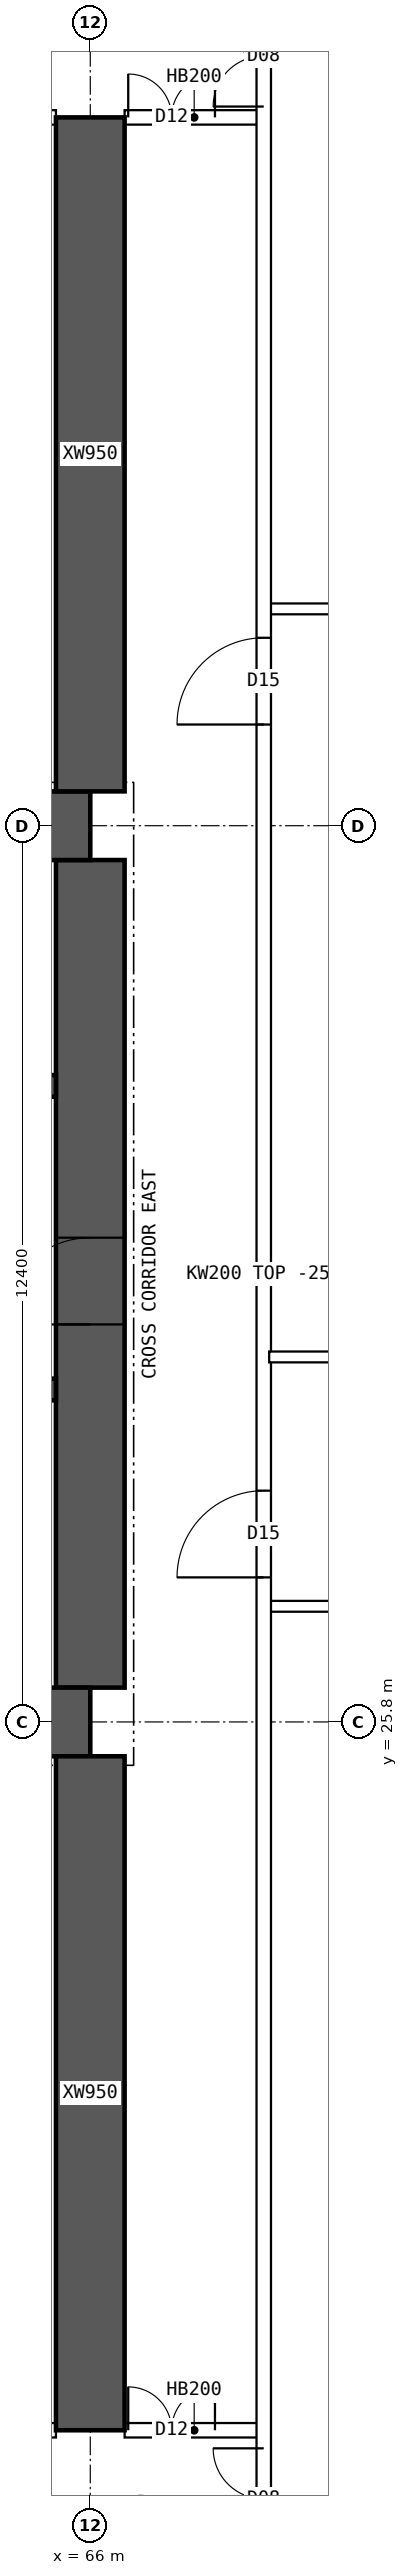
"""IFC4 building model, lengths in metres.
Left out: names, types, materials, properties, quantities, classifications, styles, units other than length and angle.
Written with IfcOpenShell. Run it as: python <this file> out.ifc"""

import sys

from ifc_helpers import new_model, si_unit, direction, frame, frame_2d, origin, place, context, subcontext, project, spatial, polyline, rectangle, outline, extrude, element, fill, save


model = new_model("IFC4")
c1 = context("Model", 3, precision=1e-05, world=origin(), true_north=direction((0.0, 1.0)))
c2 = subcontext(c1, "Body", "Model", "MODEL_VIEW")
j1 = project(units=[si_unit("LENGTHUNIT", "METRE"), si_unit("PLANEANGLEUNIT", "RADIAN")], contexts=[c1])
p1 = place(None, origin())
s1 = spatial("IfcSite", under=j1, at=p1, CompositionType="ELEMENT")
p2 = place(p1, origin())
s2 = spatial("IfcBuilding", under=s1, at=p2, CompositionType="ELEMENT")
p3 = place(p2, frame((0.0, 0.0, 99.4)))
s3 = spatial("IfcBuildingStorey", under=s2, at=p3, CompositionType="ELEMENT", Elevation=99.4)
for number, where, z_axis, x_axis in (
    (1, (18.0, 25.8, 0.0), (0.0, 0.0, 1.0), (1.0, 0.0, 0.0)),
    (2, (18.0, 38.2, 0.0), (0.0, 0.0, 1.0), (1.0, 0.0, 0.0)),
):
    element("IfcWall", number, at=place(p3, frame(where, z_axis=z_axis, x_axis=x_axis)), inside=s3, PredefinedType="SHEAR", context=c2, shape_type="SweptSolid", body=[
        extrude(rectangle(XDim=48.0, YDim=0.95, at=frame_2d((24.0, 0.0))), origin(), (0.0, 0.0, 1.0), 3.75),
    ])
p4 = place(p3, frame((66.0, 26.275, 0.0), z_axis=(0.0, 0.0, 1.0), x_axis=(0.0, 1.0, 0.0)))
e3 = element("IfcWall", 3, at=p4, inside=s3, PredefinedType="SHEAR", context=c2, shape_type="SweptSolid", body=[
    extrude(rectangle(XDim=11.45, YDim=0.95, at=frame_2d((5.725, 0.0))), origin(), (0.0, 0.0, 1.0), 3.75),
])
p5 = place(p4, frame((5.025, 0.0, 0.0)))
e4 = element("IfcOpeningElement", 4, at=p5, cuts=e3, PredefinedType="OPENING", context=c2, shape_type="SweptSolid", body=[
    extrude(rectangle(XDim=1.2, YDim=2.1, at=frame_2d((0.6, 1.05))), frame((0.0, 0.485, 0.0), z_axis=(0.0, -1.0, 0.0), x_axis=(1.0, 0.0, 0.0)), (0.0, 0.0, 1.0), 0.97),
])
p6 = place(p3, frame((18.475, 30.4, 0.0), z_axis=(0.0, 0.0, 1.0), x_axis=(1.0, 0.0, 0.0)))
e5 = element("IfcWall", 5, at=p6, inside=s3, PredefinedType="SHEAR", context=c2, shape_type="SweptSolid", body=[
    extrude(rectangle(XDim=47.05, YDim=0.3, at=frame_2d((23.525, 0.0))), origin(), (0.0, 0.0, 1.0), 3.75),
])
p7 = place(p6, frame((0.4, 0.0, 0.0)))
e6 = element("IfcOpeningElement", 6, at=p7, cuts=e5, PredefinedType="OPENING", context=c2, shape_type="SweptSolid", body=[
    extrude(rectangle(XDim=1.0, YDim=2.1, at=frame_2d((0.5, 1.05))), frame((0.0, 0.16, 0.0), z_axis=(0.0, -1.0, 0.0), x_axis=(1.0, 0.0, 0.0)), (0.0, 0.0, 1.0), 0.32),
])
p8 = place(p6, frame((45.65, 0.0, 0.0)))
e7 = element("IfcOpeningElement", 7, at=p8, cuts=e5, PredefinedType="OPENING", context=c2, shape_type="SweptSolid", body=[
    extrude(rectangle(XDim=1.0, YDim=2.1, at=frame_2d((0.5, 1.05))), frame((0.0, 0.16, 0.0), z_axis=(0.0, -1.0, 0.0), x_axis=(1.0, 0.0, 0.0)), (0.0, 0.0, 1.0), 0.32),
])
p9 = place(p6, frame((8.275, 0.0, 0.0)))
e8 = element("IfcOpeningElement", 8, at=p9, cuts=e5, PredefinedType="OPENING", context=c2, shape_type="SweptSolid", body=[
    extrude(rectangle(XDim=1.1, YDim=2.1, at=frame_2d((0.55, 1.05))), frame((0.0, 0.16, 0.0), z_axis=(0.0, -1.0, 0.0), x_axis=(1.0, 0.0, 0.0)), (0.0, 0.0, 1.0), 0.32),
])
p10 = place(p6, frame((10.875, 0.0, 0.0)))
e9 = element("IfcOpeningElement", 9, at=p10, cuts=e5, PredefinedType="OPENING", context=c2, shape_type="SweptSolid", body=[
    extrude(rectangle(XDim=1.1, YDim=2.1, at=frame_2d((0.55, 1.05))), frame((0.0, 0.16, 0.0), z_axis=(0.0, -1.0, 0.0), x_axis=(1.0, 0.0, 0.0)), (0.0, 0.0, 1.0), 0.32),
])
p11 = place(p6, frame((13.475, 0.0, 0.0)))
e10 = element("IfcOpeningElement", 10, at=p11, cuts=e5, PredefinedType="OPENING", context=c2, shape_type="SweptSolid", body=[
    extrude(rectangle(XDim=1.1, YDim=2.1, at=frame_2d((0.55, 1.05))), frame((0.0, 0.16, 0.0), z_axis=(0.0, -1.0, 0.0), x_axis=(1.0, 0.0, 0.0)), (0.0, 0.0, 1.0), 0.32),
])
p12 = place(p6, frame((16.075, 0.0, 0.0)))
e11 = element("IfcOpeningElement", 11, at=p12, cuts=e5, PredefinedType="OPENING", context=c2, shape_type="SweptSolid", body=[
    extrude(rectangle(XDim=1.1, YDim=2.1, at=frame_2d((0.55, 1.05))), frame((0.0, 0.16, 0.0), z_axis=(0.0, -1.0, 0.0), x_axis=(1.0, 0.0, 0.0)), (0.0, 0.0, 1.0), 0.32),
])
p13 = place(p6, frame((18.85, 0.0, 0.0)))
e12 = element("IfcOpeningElement", 12, at=p13, cuts=e5, PredefinedType="OPENING", context=c2, shape_type="SweptSolid", body=[
    extrude(rectangle(XDim=0.9, YDim=2.1, at=frame_2d((0.45, 1.05))), frame((0.0, 0.16, 0.0), z_axis=(0.0, -1.0, 0.0), x_axis=(1.0, 0.0, 0.0)), (0.0, 0.0, 1.0), 0.32),
])
p14 = place(p6, frame((30.142, 0.0, 0.0)))
e13 = element("IfcOpeningElement", 13, at=p14, cuts=e5, PredefinedType="OPENING", context=c2, shape_type="SweptSolid", body=[
    extrude(rectangle(XDim=1.1, YDim=2.1, at=frame_2d((0.55, 1.05))), frame((0.0, 0.16, 0.0), z_axis=(0.0, -1.0, 0.0), x_axis=(1.0, 0.0, 0.0)), (0.0, 0.0, 1.0), 0.32),
])
p15 = place(p6, frame((33.675, 0.0, 0.0)))
e14 = element("IfcOpeningElement", 14, at=p15, cuts=e5, PredefinedType="OPENING", context=c2, shape_type="SweptSolid", body=[
    extrude(rectangle(XDim=1.1, YDim=2.1, at=frame_2d((0.55, 1.05))), frame((0.0, 0.16, 0.0), z_axis=(0.0, -1.0, 0.0), x_axis=(1.0, 0.0, 0.0)), (0.0, 0.0, 1.0), 0.32),
])
p16 = place(p6, frame((37.208, 0.0, 0.0)))
e15 = element("IfcOpeningElement", 15, at=p16, cuts=e5, PredefinedType="OPENING", context=c2, shape_type="SweptSolid", body=[
    extrude(rectangle(XDim=1.1, YDim=2.1, at=frame_2d((0.55, 1.05))), frame((0.0, 0.16, 0.0), z_axis=(0.0, -1.0, 0.0), x_axis=(1.0, 0.0, 0.0)), (0.0, 0.0, 1.0), 0.32),
])
p17 = place(p3, frame((18.475, 34.6, 0.0), z_axis=(0.0, 0.0, 1.0), x_axis=(1.0, 0.0, 0.0)))
e16 = element("IfcWall", 16, at=p17, inside=s3, PredefinedType="SHEAR", context=c2, shape_type="SweptSolid", body=[
    extrude(rectangle(XDim=47.05, YDim=0.3, at=frame_2d((23.525, 0.0))), origin(), (0.0, 0.0, 1.0), 3.75),
])
p18 = place(p17, frame((0.9, 0.0, 0.0)))
e17 = element("IfcOpeningElement", 17, at=p18, cuts=e16, PredefinedType="OPENING", context=c2, shape_type="SweptSolid", body=[
    extrude(rectangle(XDim=1.1, YDim=2.1, at=frame_2d((0.55, 1.05))), frame((0.0, 0.16, 0.0), z_axis=(0.0, -1.0, 0.0), x_axis=(1.0, 0.0, 0.0)), (0.0, 0.0, 1.0), 0.32),
])
p19 = place(p17, frame((45.05, 0.0, 0.0)))
e18 = element("IfcOpeningElement", 18, at=p19, cuts=e16, PredefinedType="OPENING", context=c2, shape_type="SweptSolid", body=[
    extrude(rectangle(XDim=1.1, YDim=2.1, at=frame_2d((0.55, 1.05))), frame((0.0, 0.16, 0.0), z_axis=(0.0, -1.0, 0.0), x_axis=(1.0, 0.0, 0.0)), (0.0, 0.0, 1.0), 0.32),
])
p20 = place(p17, frame((4.125, 0.0, 0.0)))
e19 = element("IfcOpeningElement", 19, at=p20, cuts=e16, PredefinedType="OPENING", context=c2, shape_type="SweptSolid", body=[
    extrude(rectangle(XDim=0.9, YDim=2.1, at=frame_2d((0.45, 1.05))), frame((0.0, 0.16, 0.0), z_axis=(0.0, -1.0, 0.0), x_axis=(1.0, 0.0, 0.0)), (0.0, 0.0, 1.0), 0.32),
])
p21 = place(p17, frame((42.025, 0.0, 0.0)))
e20 = element("IfcOpeningElement", 20, at=p21, cuts=e16, PredefinedType="OPENING", context=c2, shape_type="SweptSolid", body=[
    extrude(rectangle(XDim=0.9, YDim=2.1, at=frame_2d((0.45, 1.05))), frame((0.0, 0.16, 0.0), z_axis=(0.0, -1.0, 0.0), x_axis=(1.0, 0.0, 0.0)), (0.0, 0.0, 1.0), 0.32),
])
p22 = place(p17, frame((8.9, 0.0, 0.0)))
e21 = element("IfcOpeningElement", 21, at=p22, cuts=e16, PredefinedType="OPENING", context=c2, shape_type="SweptSolid", body=[
    extrude(rectangle(XDim=0.9, YDim=2.1, at=frame_2d((0.45, 1.05))), frame((0.0, 0.16, 0.0), z_axis=(0.0, -1.0, 0.0), x_axis=(1.0, 0.0, 0.0)), (0.0, 0.0, 1.0), 0.32),
])
p23 = place(p17, frame((12.874, 0.0, 0.0)))
e22 = element("IfcOpeningElement", 22, at=p23, cuts=e16, PredefinedType="OPENING", context=c2, shape_type="SweptSolid", body=[
    extrude(rectangle(XDim=0.9, YDim=2.1, at=frame_2d((0.45, 1.05))), frame((0.0, 0.16, 0.0), z_axis=(0.0, -1.0, 0.0), x_axis=(1.0, 0.0, 0.0)), (0.0, 0.0, 1.0), 0.32),
])
p24 = place(p17, frame((16.521, 0.0, 0.0)))
e23 = element("IfcOpeningElement", 23, at=p24, cuts=e16, PredefinedType="OPENING", context=c2, shape_type="SweptSolid", body=[
    extrude(rectangle(XDim=0.9, YDim=2.1, at=frame_2d((0.45, 1.05))), frame((0.0, 0.16, 0.0), z_axis=(0.0, -1.0, 0.0), x_axis=(1.0, 0.0, 0.0)), (0.0, 0.0, 1.0), 0.32),
])
p25 = place(p17, frame((20.28, 0.0, 0.0)))
e24 = element("IfcOpeningElement", 24, at=p25, cuts=e16, PredefinedType="OPENING", context=c2, shape_type="SweptSolid", body=[
    extrude(rectangle(XDim=0.9, YDim=2.1, at=frame_2d((0.45, 1.05))), frame((0.0, 0.16, 0.0), z_axis=(0.0, -1.0, 0.0), x_axis=(1.0, 0.0, 0.0)), (0.0, 0.0, 1.0), 0.32),
])
p26 = place(p17, frame((24.686, 0.0, 0.0)))
e25 = element("IfcOpeningElement", 25, at=p26, cuts=e16, PredefinedType="OPENING", context=c2, shape_type="SweptSolid", body=[
    extrude(rectangle(XDim=0.9, YDim=2.1, at=frame_2d((0.45, 1.05))), frame((0.0, 0.16, 0.0), z_axis=(0.0, -1.0, 0.0), x_axis=(1.0, 0.0, 0.0)), (0.0, 0.0, 1.0), 0.32),
])
p27 = place(p17, frame((27.483, 0.0, 0.0)))
e26 = element("IfcOpeningElement", 26, at=p27, cuts=e16, PredefinedType="OPENING", context=c2, shape_type="SweptSolid", body=[
    extrude(rectangle(XDim=0.9, YDim=2.1, at=frame_2d((0.45, 1.05))), frame((0.0, 0.16, 0.0), z_axis=(0.0, -1.0, 0.0), x_axis=(1.0, 0.0, 0.0)), (0.0, 0.0, 1.0), 0.32),
])
p28 = place(p17, frame((29.653, 0.0, 0.0)))
e27 = element("IfcOpeningElement", 27, at=p28, cuts=e16, PredefinedType="OPENING", context=c2, shape_type="SweptSolid", body=[
    extrude(rectangle(XDim=0.9, YDim=2.1, at=frame_2d((0.45, 1.05))), frame((0.0, 0.16, 0.0), z_axis=(0.0, -1.0, 0.0), x_axis=(1.0, 0.0, 0.0)), (0.0, 0.0, 1.0), 0.32),
])
p29 = place(p17, frame((33.452, 0.0, 0.0)))
e28 = element("IfcOpeningElement", 28, at=p29, cuts=e16, PredefinedType="OPENING", context=c2, shape_type="SweptSolid", body=[
    extrude(rectangle(XDim=0.9, YDim=2.1, at=frame_2d((0.45, 1.05))), frame((0.0, 0.16, 0.0), z_axis=(0.0, -1.0, 0.0), x_axis=(1.0, 0.0, 0.0)), (0.0, 0.0, 1.0), 0.32),
])
p30 = place(p17, frame((37.403, 0.0, 0.0)))
e29 = element("IfcOpeningElement", 29, at=p30, cuts=e16, PredefinedType="OPENING", context=c2, shape_type="SweptSolid", body=[
    extrude(rectangle(XDim=0.9, YDim=2.1, at=frame_2d((0.45, 1.05))), frame((0.0, 0.16, 0.0), z_axis=(0.0, -1.0, 0.0), x_axis=(1.0, 0.0, 0.0)), (0.0, 0.0, 1.0), 0.32),
])
for number, where, z_axis, x_axis in (
    (30, (66.0, 16.0, 0.0), (0.0, 0.0, 1.0), (0.0, 1.0, 0.0)),
    (31, (66.0, 38.675, 0.0), (0.0, 0.0, 1.0), (0.0, 1.0, 0.0)),
):
    element("IfcWall", number, at=place(p3, frame(where, z_axis=z_axis, x_axis=x_axis)), inside=s3, PredefinedType="SHEAR", context=c2, shape_type="SweptSolid", body=[
        extrude(rectangle(XDim=9.325, YDim=0.95, at=frame_2d((4.663, 0.0))), origin(), (0.0, 0.0, 1.0), 3.75),
    ])
p31 = place(p3, frame((60.475, 16.0, 0.0), z_axis=(0.0, 0.0, 1.0), x_axis=(1.0, 0.0, 0.0)))
e32 = element("IfcWall", 32, at=p31, inside=s3, PredefinedType="SOLIDWALL", context=c2, shape_type="SweptSolid", body=[
    extrude(rectangle(XDim=5.05, YDim=0.2, at=frame_2d((2.525, 0.0))), origin(), (0.0, 0.0, 1.0), 3.5),
])
p32 = place(p31, frame((0.15, 0.0, 0.0)))
e33 = element("IfcOpeningElement", 33, at=p32, cuts=e32, PredefinedType="OPENING", context=c2, shape_type="SweptSolid", body=[
    extrude(rectangle(XDim=0.9, YDim=2.1, at=frame_2d((0.45, 1.05))), frame((0.0, 0.11, 0.0), z_axis=(0.0, -1.0, 0.0), x_axis=(1.0, 0.0, 0.0)), (0.0, 0.0, 1.0), 0.22),
])
p33 = place(p31, frame((3.185, 0.0, 0.0)))
e34 = element("IfcOpeningElement", 34, at=p33, cuts=e32, PredefinedType="OPENING", context=c2, shape_type="SweptSolid", body=[
    extrude(rectangle(XDim=0.9, YDim=2.1, at=frame_2d((0.45, 1.05))), frame((0.0, 0.11, 0.0), z_axis=(0.0, -1.0, 0.0), x_axis=(1.0, 0.0, 0.0)), (0.0, 0.0, 1.0), 0.22),
])
p34 = place(p3, frame((66.475, 16.0, 0.0), z_axis=(0.0, 0.0, 1.0), x_axis=(1.0, 0.0, 0.0)))
e35 = element("IfcWall", 35, at=p34, inside=s3, PredefinedType="SOLIDWALL", context=c2, shape_type="SweptSolid", body=[
    extrude(rectangle(XDim=1.925, YDim=0.2, at=frame_2d((0.962, 0.0))), origin(), (0.0, 0.0, 1.0), 3.5),
])
p35 = place(p34, frame((0.05, 0.0, 0.0)))
e36 = element("IfcOpeningElement", 36, at=p35, cuts=e35, PredefinedType="OPENING", context=c2, shape_type="SweptSolid", body=[
    extrude(rectangle(XDim=1.2, YDim=2.1, at=frame_2d((0.6, 1.05))), frame((0.0, 0.11, 0.0), z_axis=(0.0, -1.0, 0.0), x_axis=(1.0, 0.0, 0.0)), (0.0, 0.0, 1.0), 0.22),
])
p36 = place(p3, frame((60.475, 48.0, 0.0), z_axis=(0.0, 0.0, 1.0), x_axis=(1.0, 0.0, 0.0)))
e37 = element("IfcWall", 37, at=p36, inside=s3, PredefinedType="SOLIDWALL", context=c2, shape_type="SweptSolid", body=[
    extrude(rectangle(XDim=5.05, YDim=0.2, at=frame_2d((2.525, 0.0))), origin(), (0.0, 0.0, 1.0), 3.5),
])
p37 = place(p36, frame((0.15, 0.0, 0.0)))
e38 = element("IfcOpeningElement", 38, at=p37, cuts=e37, PredefinedType="OPENING", context=c2, shape_type="SweptSolid", body=[
    extrude(rectangle(XDim=0.9, YDim=2.1, at=frame_2d((0.45, 1.05))), frame((0.0, 0.11, 0.0), z_axis=(0.0, -1.0, 0.0), x_axis=(1.0, 0.0, 0.0)), (0.0, 0.0, 1.0), 0.22),
])
p38 = place(p36, frame((3.205, 0.0, 0.0)))
e39 = element("IfcOpeningElement", 39, at=p38, cuts=e37, PredefinedType="OPENING", context=c2, shape_type="SweptSolid", body=[
    extrude(rectangle(XDim=0.9, YDim=2.1, at=frame_2d((0.45, 1.05))), frame((0.0, 0.11, 0.0), z_axis=(0.0, -1.0, 0.0), x_axis=(1.0, 0.0, 0.0)), (0.0, 0.0, 1.0), 0.22),
])
p39 = place(p3, frame((66.475, 48.0, 0.0), z_axis=(0.0, 0.0, 1.0), x_axis=(1.0, 0.0, 0.0)))
e40 = element("IfcWall", 40, at=p39, inside=s3, PredefinedType="SOLIDWALL", context=c2, shape_type="SweptSolid", body=[
    extrude(rectangle(XDim=1.925, YDim=0.2, at=frame_2d((0.962, 0.0))), origin(), (0.0, 0.0, 1.0), 3.5),
])
p40 = place(p39, frame((0.05, 0.0, 0.0)))
e41 = element("IfcOpeningElement", 41, at=p40, cuts=e40, PredefinedType="OPENING", context=c2, shape_type="SweptSolid", body=[
    extrude(rectangle(XDim=1.2, YDim=2.1, at=frame_2d((0.6, 1.05))), frame((0.0, 0.11, 0.0), z_axis=(0.0, -1.0, 0.0), x_axis=(1.0, 0.0, 0.0)), (0.0, 0.0, 1.0), 0.22),
])
p41 = place(p3, frame((68.475, 30.85, 0.0), z_axis=(0.0, 0.0, 1.0), x_axis=(1.0, 0.0, 0.0)))
e42 = element("IfcWall", 42, at=p41, inside=s3, PredefinedType="PARTITIONING", context=c2, shape_type="SweptSolid", body=[
    extrude(outline(polyline([(0.0, 0.0), (6.82, 0.0), (6.82, 3.5), (3.827, 3.5), (3.825, 3.05), (3.227, 3.05), (3.225, 3.5), (0.0, 3.5), (0.0, 0.0)])), frame((0.0, 0.075, 0.0), z_axis=(0.0, -1.0, 0.0), x_axis=(1.0, 0.0, 0.0)), (0.0, 0.0, 1.0), 0.15),
])
p42 = place(p3, frame((68.4, 9.405, 0.0), z_axis=(0.0, 0.0, 1.0), x_axis=(0.0, 1.0, 0.0)))
e43 = element("IfcWall", 43, at=p42, inside=s3, PredefinedType="SOLIDWALL", context=c2, shape_type="SweptSolid", body=[
    extrude(rectangle(XDim=45.189, YDim=0.2, at=frame_2d((22.595, 0.0))), origin(), (0.0, 0.0, 1.0), 3.5),
])
p43 = place(p42, frame((18.395, 0.0, 0.0)))
e44 = element("IfcOpeningElement", 44, at=p43, cuts=e43, PredefinedType="OPENING", context=c2, shape_type="SweptSolid", body=[
    extrude(rectangle(XDim=1.2, YDim=2.1, at=frame_2d((0.6, 1.05))), frame((0.0, 0.11, 0.0), z_axis=(0.0, -1.0, 0.0), x_axis=(1.0, 0.0, 0.0)), (0.0, 0.0, 1.0), 0.22),
])
p44 = place(p42, frame((30.195, 0.0, 0.0)))
e45 = element("IfcOpeningElement", 45, at=p44, cuts=e43, PredefinedType="OPENING", context=c2, shape_type="SweptSolid", body=[
    extrude(rectangle(XDim=1.2, YDim=2.1, at=frame_2d((0.6, 1.05))), frame((0.0, 0.11, 0.0), z_axis=(0.0, -1.0, 0.0), x_axis=(1.0, 0.0, 0.0)), (0.0, 0.0, 1.0), 0.22),
])
p45 = place(p42, frame((4.945, 0.0, 0.0)))
e46 = element("IfcOpeningElement", 46, at=p45, cuts=e43, PredefinedType="OPENING", context=c2, shape_type="SweptSolid", body=[
    extrude(rectangle(XDim=1.4, YDim=2.1, at=frame_2d((0.7, 1.05))), frame((0.0, 0.11, 0.0), z_axis=(0.0, -1.0, 0.0), x_axis=(1.0, 0.0, 0.0)), (0.0, 0.0, 1.0), 0.22),
])
p46 = place(p42, frame((38.745, 0.0, 0.0)))
e47 = element("IfcOpeningElement", 47, at=p46, cuts=e43, PredefinedType="OPENING", context=c2, shape_type="SweptSolid", body=[
    extrude(rectangle(XDim=1.4, YDim=2.1, at=frame_2d((0.7, 1.05))), frame((0.0, 0.11, 0.0), z_axis=(0.0, -1.0, 0.0), x_axis=(1.0, 0.0, 0.0)), (0.0, 0.0, 1.0), 0.22),
])
p47 = place(p3, frame((68.475, 27.4, 0.0), z_axis=(0.0, 0.0, 1.0), x_axis=(1.0, 0.0, 0.0)))
e48 = element("IfcWall", 48, at=p47, inside=s3, PredefinedType="PARTITIONING", context=c2, shape_type="SweptSolid", body=[
    extrude(rectangle(XDim=6.82, YDim=0.15, at=frame_2d((3.41, 0.0))), origin(), (0.0, 0.0, 1.0), 3.5),
])
p48 = place(p3, frame((68.475, 41.2, 0.0), z_axis=(0.0, 0.0, 1.0), x_axis=(1.0, 0.0, 0.0)))
e49 = element("IfcWall", 49, at=p48, inside=s3, PredefinedType="PARTITIONING", context=c2, shape_type="SweptSolid", body=[
    extrude(outline(polyline([(0.0, 0.0), (6.82, 0.0), (6.82, 3.5), (3.827, 3.5), (3.825, 3.05), (3.227, 3.05), (3.225, 3.5), (0.0, 3.5), (0.0, 0.0)])), frame((0.0, 0.075, 0.0), z_axis=(0.0, -1.0, 0.0), x_axis=(1.0, 0.0, 0.0)), (0.0, 0.0, 1.0), 0.15),
])
p49 = place(p5, origin())
e50 = element("IfcDoor", 50, at=p49, inside=s3, OperationType="SINGLE_SWING_LEFT", PredefinedType="DOOR", context=c2, shape_type="SweptSolid", body=[
    extrude(rectangle(XDim=1.2, YDim=2.1, at=frame_2d((0.6, 1.05))), frame((0.0, 0.025, 0.0), z_axis=(0.0, -1.0, 0.0), x_axis=(1.0, 0.0, 0.0)), (0.0, 0.0, 1.0), 0.05),
])
fill(e4, e50)
p50 = place(p35, origin())
e51 = element("IfcDoor", 51, at=p50, inside=s3, OperationType="DOUBLE_DOOR_SINGLE_SWING", PredefinedType="DOOR", context=c2, shape_type="SweptSolid", body=[
    extrude(rectangle(XDim=1.2, YDim=2.1, at=frame_2d((0.6, 1.05))), frame((0.0, 0.025, 0.0), z_axis=(0.0, -1.0, 0.0), x_axis=(1.0, 0.0, 0.0)), (0.0, 0.0, 1.0), 0.05),
])
fill(e36, e51)
p51 = place(p40, origin())
e52 = element("IfcDoor", 52, at=p51, inside=s3, OperationType="DOUBLE_DOOR_SINGLE_SWING", PredefinedType="DOOR", context=c2, shape_type="SweptSolid", body=[
    extrude(rectangle(XDim=1.2, YDim=2.1, at=frame_2d((0.6, 1.05))), frame((0.0, 0.025, 0.0), z_axis=(0.0, -1.0, 0.0), x_axis=(1.0, 0.0, 0.0)), (0.0, 0.0, 1.0), 0.05),
])
fill(e41, e52)
p52 = place(p43, origin())
e53 = element("IfcDoor", 53, at=p52, inside=s3, OperationType="SINGLE_SWING_LEFT", PredefinedType="DOOR", context=c2, shape_type="SweptSolid", body=[
    extrude(rectangle(XDim=1.2, YDim=2.1, at=frame_2d((0.6, 1.05))), frame((0.0, 0.025, 0.0), z_axis=(0.0, -1.0, 0.0), x_axis=(1.0, 0.0, 0.0)), (0.0, 0.0, 1.0), 0.05),
])
fill(e44, e53)
p53 = place(p44, origin())
e54 = element("IfcDoor", 54, at=p53, inside=s3, OperationType="SINGLE_SWING_LEFT", PredefinedType="DOOR", context=c2, shape_type="SweptSolid", body=[
    extrude(rectangle(XDim=1.2, YDim=2.1, at=frame_2d((0.6, 1.05))), frame((0.0, 0.025, 0.0), z_axis=(0.0, -1.0, 0.0), x_axis=(1.0, 0.0, 0.0)), (0.0, 0.0, 1.0), 0.05),
])
fill(e45, e54)
p54 = place(p45, origin())
e55 = element("IfcDoor", 55, at=p54, inside=s3, OperationType="DOUBLE_DOOR_SINGLE_SWING", PredefinedType="DOOR", context=c2, shape_type="SweptSolid", body=[
    extrude(rectangle(XDim=1.4, YDim=2.1, at=frame_2d((0.7, 1.05))), frame((0.0, 0.025, 0.0), z_axis=(0.0, -1.0, 0.0), x_axis=(1.0, 0.0, 0.0)), (0.0, 0.0, 1.0), 0.05),
])
fill(e46, e55)
p55 = place(p46, origin())
e56 = element("IfcDoor", 56, at=p55, inside=s3, OperationType="DOUBLE_DOOR_SINGLE_SWING", PredefinedType="DOOR", context=c2, shape_type="SweptSolid", body=[
    extrude(rectangle(XDim=1.4, YDim=2.1, at=frame_2d((0.7, 1.05))), frame((0.0, 0.025, 0.0), z_axis=(0.0, -1.0, 0.0), x_axis=(1.0, 0.0, 0.0)), (0.0, 0.0, 1.0), 0.05),
])
fill(e47, e56)
save(model, sys.argv[1])
